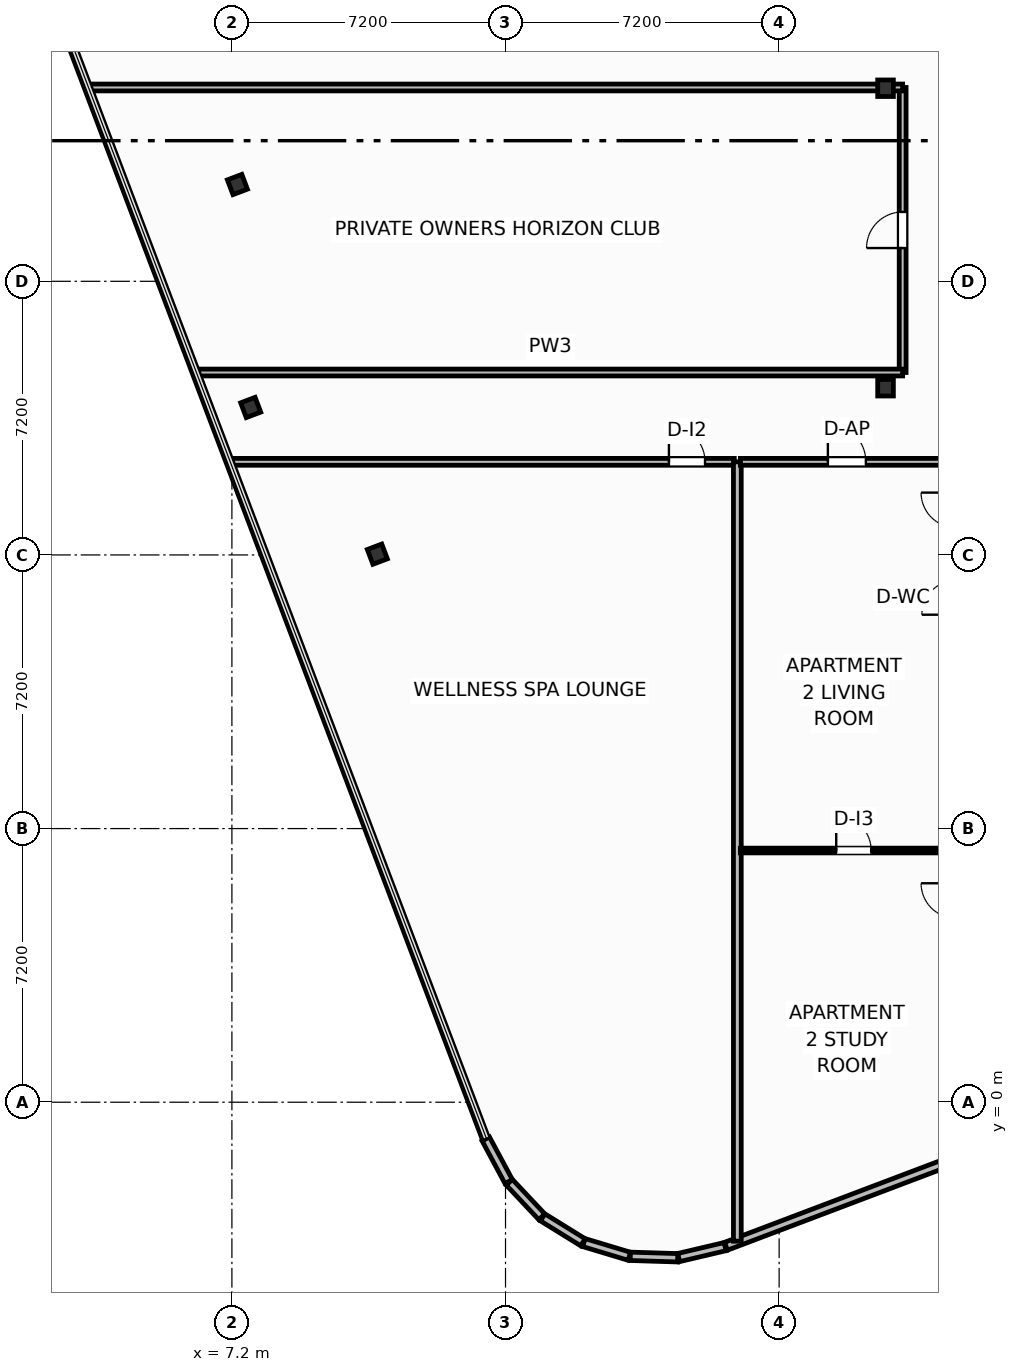
"""IFC4 building model, lengths in metres.
Left out: names, types, materials, properties, quantities, classifications, styles, units other than length and angle.
Written with IfcOpenShell. Run it as: python <this file> out.ifc"""

import sys

from ifc_helpers import new_model, si_unit, direction, frame, frame_2d, origin, origin_2d, place, context, subcontext, project, spatial, rectangle, i_section, extrude, element, fill, save


model = new_model("IFC4")
c1 = context("Model", 3, precision=1e-05, world=origin(), true_north=direction((0.0, 1.0)))
c2 = subcontext(c1, "Body", "Model", "MODEL_VIEW")
j1 = project(units=[si_unit("LENGTHUNIT", "METRE"), si_unit("PLANEANGLEUNIT", "RADIAN")], contexts=[c1])
p1 = place(None, origin())
s1 = spatial("IfcSite", under=j1, at=p1, CompositionType="ELEMENT")
p2 = place(p1, origin())
s2 = spatial("IfcBuilding", under=s1, at=p2, CompositionType="ELEMENT")
p3 = place(p2, frame((0.0, 0.0, 220.1)))
s3 = spatial("IfcBuildingStorey", under=s2, at=p3, CompositionType="ELEMENT", Elevation=220.1)
for number, where, z_axis, x_axis in (
    (1, (24.4, 18.8, 0.0), (0.0, 0.0, 1.0), (1.0, 0.0, 0.0)),
    (2, (24.4, 26.68, 0.0), (0.0, 0.0, 1.0), (1.0, 0.0, 0.0)),
):
    element("IfcColumn", number, at=place(p3, frame(where, z_axis=z_axis, x_axis=x_axis)), inside=s3, PredefinedType="COLUMN", context=c2, shape_type="SweptSolid", body=[
        extrude(i_section(OverallWidth=0.412, OverallDepth=0.435, WebThickness=0.036, FlangeThickness=0.057, FilletRadius=0.025, at=origin_2d()), origin(), (0.0, 0.0, 1.0), 3.7),
    ])
for number, where, z_axis, x_axis in (
    (3, (7.345, 24.146, 0.0), (0.0, 0.0, 1.0), (0.935, 0.354, 0.0)),
    (4, (7.695, 18.281, 0.0), (0.0, 0.0, 1.0), (0.935, 0.354, 0.0)),
    (5, (11.027, 14.42, 0.0), (0.0, 0.0, 1.0), (0.935, 0.354, 0.0)),
):
    element("IfcColumn", number, at=place(p3, frame(where, z_axis=z_axis, x_axis=x_axis)), inside=s3, PredefinedType="COLUMN", context=c2, shape_type="SweptSolid", body=[
        extrude(i_section(OverallWidth=0.406, OverallDepth=0.416, WebThickness=0.03, FlangeThickness=0.048, FilletRadius=0.025, at=origin_2d()), origin(), (0.0, 0.0, 1.0), 3.7),
    ])
p4 = place(p3, frame((13.881, -0.966, 0.0), z_axis=(0.0, 0.0, 1.0), x_axis=(0.473242342135, -0.88093228208, 0.0)))
e6 = element("IfcWall", 6, at=p4, inside=s3, PredefinedType="SOLIDWALL", context=c2, shape_type="SweptSolid", body=[
    extrude(rectangle(XDim=1.274, YDim=0.22, at=frame_2d((0.637, 0.0))), origin(), (0.0, 0.0, 1.0), 2.73),
])
for number, where, z_axis, x_axis in (
    (7, (14.5, -2.106, 0.0), (0.0, 0.0, 1.0), (0.685, -0.729, 0.0)),
    (8, (15.377, -3.029, 0.0), (0.0, 0.0, 1.0), (0.85, -0.526, 0.0)),
    (9, (16.463, -3.694, 0.0), (0.0, 0.0, 1.0), (0.958, -0.288, 0.0)),
):
    element("IfcWall", number, at=place(p3, frame(where, z_axis=z_axis, x_axis=x_axis)), inside=s3, PredefinedType="SOLIDWALL", context=c2, shape_type="SweptSolid", body=[
        extrude(rectangle(XDim=1.249, YDim=0.22, at=frame_2d((0.624, 0.0))), origin(), (0.0, 0.0, 1.0), 2.73),
    ])
p5 = place(p3, frame((17.683, -4.055, 0.0), z_axis=(0.0, 0.0, 1.0), x_axis=(0.999522886512, -0.030886879732, 0.0)))
e10 = element("IfcWall", 10, at=p5, inside=s3, PredefinedType="SOLIDWALL", context=c2, shape_type="SweptSolid", body=[
    extrude(rectangle(XDim=1.249, YDim=0.22, at=frame_2d((0.625, 0.0))), origin(), (0.0, 0.0, 1.0), 2.73),
])
p6 = place(p3, frame((18.956, -4.087, 0.0), z_axis=(0.0, 0.0, 1.0), x_axis=(0.973463008152, 0.228844426981, 0.0)))
e11 = element("IfcWall", 11, at=p6, inside=s3, PredefinedType="SOLIDWALL", context=c2, shape_type="SweptSolid", body=[
    extrude(rectangle(XDim=1.257, YDim=0.22, at=frame_2d((0.628, 0.0))), origin(), (0.0, 0.0, 1.0), 2.73),
])
p7 = place(p3, frame((20.202, -3.791, 0.0), z_axis=(0.0, 0.0, 1.0), x_axis=(0.935225574232, 0.354052432984, 0.0)))
e12 = element("IfcWall", 12, at=p7, inside=s3, PredefinedType="SOLIDWALL", context=c2, shape_type="SweptSolid", body=[
    extrude(rectangle(XDim=17.747, YDim=0.22, at=frame_2d((8.874, 0.0))), origin(), (0.0, 0.0, 1.0), 2.73),
])
p8 = place(p7, frame((7.823, 0.0, 0.8)))
e13 = element("IfcOpeningElement", 13, at=p8, cuts=e12, PredefinedType="OPENING", context=c2, shape_type="SweptSolid", body=[
    extrude(rectangle(XDim=2.1, YDim=1.75, at=frame_2d((1.05, 0.875))), frame((0.0, 0.12, 0.0), z_axis=(0.0, -1.0, 0.0), x_axis=(1.0, 0.0, 0.0)), (0.0, 0.0, 1.0), 0.24),
])
p9 = place(p7, frame((11.298, 0.0, 0.8)))
e14 = element("IfcOpeningElement", 14, at=p9, cuts=e12, PredefinedType="OPENING", context=c2, shape_type="SweptSolid", body=[
    extrude(rectangle(XDim=1.15, YDim=1.4, at=frame_2d((0.575, 0.7))), frame((0.0, 0.12, 0.0), z_axis=(0.0, -1.0, 0.0), x_axis=(1.0, 0.0, 0.0)), (0.0, 0.0, 1.0), 0.24),
])
p10 = place(p3, frame((7.196, 16.85, 0.0), z_axis=(0.0, 0.0, 1.0), x_axis=(1.0, 0.0, 0.0)))
e15 = element("IfcWall", 15, at=p10, inside=s3, PredefinedType="PARTITIONING", context=c2, shape_type="SweptSolid", body=[
    extrude(rectangle(XDim=13.224, YDim=0.18, at=frame_2d((6.612, 0.0))), origin(), (0.0, 0.0, 1.0), 3.45),
])
p11 = place(p10, frame((11.504, 0.0, 0.0)))
e16 = element("IfcOpeningElement", 16, at=p11, cuts=e15, PredefinedType="OPENING", context=c2, shape_type="SweptSolid", body=[
    extrude(rectangle(XDim=0.95, YDim=2.05, at=frame_2d((0.475, 1.025))), frame((0.0, 0.1, 0.0), z_axis=(0.0, -1.0, 0.0), x_axis=(1.0, 0.0, 0.0)), (0.0, 0.0, 1.0), 0.2),
])
p12 = place(p3, frame((20.5, -3.657, 0.0), z_axis=(0.0, 0.0, 1.0), x_axis=(0.0, 1.0, 0.0)))
e17 = element("IfcWall", 17, at=p12, inside=s3, PredefinedType="PARTITIONING", context=c2, shape_type="SweptSolid", body=[
    extrude(rectangle(XDim=20.507, YDim=0.205, at=frame_2d((10.253, 0.0))), origin(), (0.0, 0.0, 1.0), 3.45),
])
p13 = place(p3, frame((20.58, 6.623, 0.0), z_axis=(0.0, 0.0, 1.0), x_axis=(1.0, 0.0, 0.0)))
e18 = element("IfcWall", 18, at=p13, inside=s3, PredefinedType="PARTITIONING", context=c2, shape_type="SweptSolid", body=[
    extrude(rectangle(XDim=5.605, YDim=0.125, at=frame_2d((2.803, 0.0))), origin(), (0.0, 0.0, 1.0), 3.45),
])
p14 = place(p13, frame((2.522, 0.0, 0.0)))
e19 = element("IfcOpeningElement", 19, at=p14, cuts=e18, PredefinedType="OPENING", context=c2, shape_type="SweptSolid", body=[
    extrude(rectangle(XDim=0.92, YDim=2.05, at=frame_2d((0.46, 1.025))), frame((0.0, 0.073, 0.0), z_axis=(0.0, -1.0, 0.0), x_axis=(1.0, 0.0, 0.0)), (0.0, 0.0, 1.0), 0.145),
])
p15 = place(p3, frame((20.58, 16.85, 0.0), z_axis=(0.0, 0.0, 1.0), x_axis=(1.0, 0.0, 0.0)))
e20 = element("IfcWall", 20, at=p15, inside=s3, PredefinedType="PARTITIONING", context=c2, shape_type="SweptSolid", body=[
    extrude(rectangle(XDim=9.84, YDim=0.18, at=frame_2d((4.92, 0.0))), origin(), (0.0, 0.0, 1.0), 3.45),
])
p16 = place(p15, frame((2.302, 0.0, 0.0)))
e21 = element("IfcOpeningElement", 21, at=p16, cuts=e20, PredefinedType="OPENING", context=c2, shape_type="SweptSolid", body=[
    extrude(rectangle(XDim=1.0, YDim=2.2, at=frame_2d((0.5, 1.1))), frame((0.0, 0.1, 0.0), z_axis=(0.0, -1.0, 0.0), x_axis=(1.0, 0.0, 0.0)), (0.0, 0.0, 1.0), 0.2),
])
p17 = place(p3, frame((24.85, 19.2, 0.0), z_axis=(0.0, 0.0, 1.0), x_axis=(0.0, 1.0, 0.0)))
e22 = element("IfcWall", 22, at=p17, inside=s3, PredefinedType="PARTITIONING", context=c2, shape_type="SweptSolid", body=[
    extrude(rectangle(XDim=7.5, YDim=0.18, at=frame_2d((3.75, 0.0))), origin(), (0.0, 0.0, 1.0), 3.45),
])
p18 = place(p17, frame((3.275, 0.0, 0.0)))
e23 = element("IfcOpeningElement", 23, at=p18, cuts=e22, PredefinedType="OPENING", context=c2, shape_type="SweptSolid", body=[
    extrude(rectangle(XDim=0.95, YDim=2.05, at=frame_2d((0.475, 1.025))), frame((0.0, 0.1, 0.0), z_axis=(0.0, -1.0, 0.0), x_axis=(1.0, 0.0, 0.0)), (0.0, 0.0, 1.0), 0.2),
])
p19 = place(p3, frame((6.306, 19.2, 0.0), z_axis=(0.0, 0.0, 1.0), x_axis=(1.0, 0.0, 0.0)))
e24 = element("IfcWall", 24, at=p19, inside=s3, PredefinedType="PARTITIONING", context=c2, shape_type="SweptSolid", body=[
    extrude(rectangle(XDim=18.544, YDim=0.18, at=frame_2d((9.272, 0.0))), origin(), (0.0, 0.0, 1.0), 3.45),
])
p20 = place(p3, frame((3.467, 26.7, 0.0), z_axis=(0.0, 0.0, 1.0), x_axis=(1.0, 0.0, 0.0)))
e25 = element("IfcWall", 25, at=p20, inside=s3, PredefinedType="PARTITIONING", context=c2, shape_type="SweptSolid", body=[
    extrude(rectangle(XDim=21.383, YDim=0.18, at=frame_2d((10.691, 0.0))), origin(), (0.0, 0.0, 1.0), 2.662),
])
p21 = place(p11, origin())
e26 = element("IfcDoor", 26, at=p21, inside=s3, OperationType="SINGLE_SWING_LEFT", PredefinedType="DOOR", context=c2, shape_type="SweptSolid", body=[
    extrude(rectangle(XDim=0.95, YDim=2.05, at=frame_2d((0.475, 1.025))), frame((0.0, 0.025, 0.0), z_axis=(0.0, -1.0, 0.0), x_axis=(1.0, 0.0, 0.0)), (0.0, 0.0, 1.0), 0.05),
])
fill(e16, e26)
p22 = place(p14, origin())
e27 = element("IfcDoor", 27, at=p22, inside=s3, OperationType="SINGLE_SWING_LEFT", PredefinedType="DOOR", context=c2, shape_type="SweptSolid", body=[
    extrude(rectangle(XDim=0.92, YDim=2.05, at=frame_2d((0.46, 1.025))), frame((0.0, 0.025, 0.0), z_axis=(0.0, -1.0, 0.0), x_axis=(1.0, 0.0, 0.0)), (0.0, 0.0, 1.0), 0.05),
])
fill(e19, e27)
p23 = place(p16, origin())
e28 = element("IfcDoor", 28, at=p23, inside=s3, OperationType="SINGLE_SWING_LEFT", PredefinedType="DOOR", context=c2, shape_type="SweptSolid", body=[
    extrude(rectangle(XDim=1.0, YDim=2.2, at=frame_2d((0.5, 1.1))), frame((0.0, 0.025, 0.0), z_axis=(0.0, -1.0, 0.0), x_axis=(1.0, 0.0, 0.0)), (0.0, 0.0, 1.0), 0.05),
])
fill(e21, e28)
p24 = place(p18, origin())
e29 = element("IfcDoor", 29, at=p24, inside=s3, OperationType="SINGLE_SWING_LEFT", PredefinedType="DOOR", context=c2, shape_type="SweptSolid", body=[
    extrude(rectangle(XDim=0.95, YDim=2.05, at=frame_2d((0.475, 1.025))), frame((0.0, 0.025, 0.0), z_axis=(0.0, -1.0, 0.0), x_axis=(1.0, 0.0, 0.0)), (0.0, 0.0, 1.0), 0.05),
])
fill(e23, e29)
save(model, sys.argv[1])
